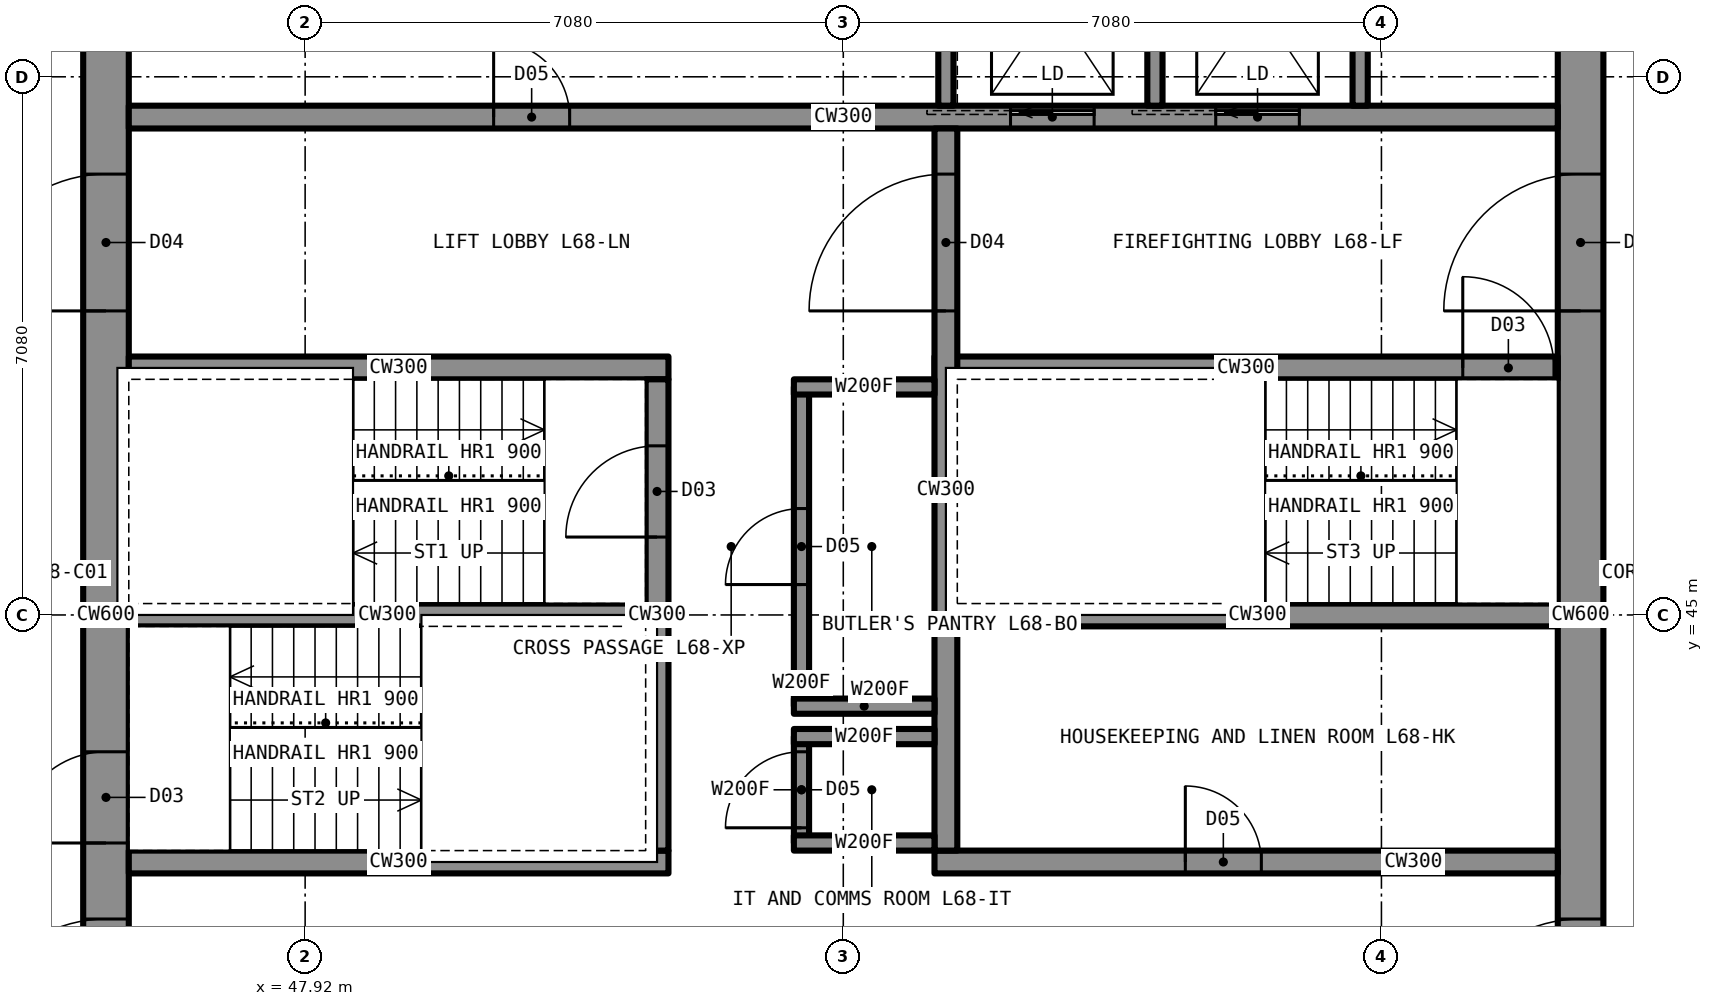
"""IFC4 building model, lengths in metres.
Left out: names, types, materials, properties, quantities, classifications, styles, units other than length and angle.
Written with IfcOpenShell. Run it as: python <this file> out.ifc"""

import sys

from ifc_helpers import new_model, si_unit, direction, frame, frame_2d, origin, place, context, subcontext, project, spatial, rectangle, extrude, element, fill, save


model = new_model("IFC4")
c1 = context("Model", 3, precision=1e-05, world=origin(), true_north=direction((0.0, 1.0)))
c2 = subcontext(c1, "Body", "Model", "MODEL_VIEW")
j1 = project(units=[si_unit("LENGTHUNIT", "METRE"), si_unit("PLANEANGLEUNIT", "RADIAN")], contexts=[c1])
p1 = place(None, origin())
s1 = spatial("IfcSite", under=j1, at=p1, CompositionType="ELEMENT")
p2 = place(p1, origin())
s2 = spatial("IfcBuilding", under=s1, at=p2, CompositionType="ELEMENT")
p3 = place(p2, frame((0.0, 0.0, 247.7)))
s3 = spatial("IfcBuildingStorey", under=s2, at=p3, CompositionType="ELEMENT", Elevation=247.7)
p4 = place(p3, frame((64.7, 35.6, 0.0), z_axis=(0.0, 0.0, 1.0), x_axis=(0.0, 1.0, 0.0)))
e1 = element("IfcWall", 1, at=p4, inside=s3, PredefinedType="SHEAR", context=c2, shape_type="SweptSolid", body=[
    extrude(rectangle(XDim=18.8, YDim=0.6, at=frame_2d((9.4, 0.0))), origin(), (0.0, 0.0, 1.0), 3.5),
])
p5 = place(p4, frame((13.4, 0.0, 0.0)))
e2 = element("IfcOpeningElement", 2, at=p5, cuts=e1, PredefinedType="OPENING", context=c2, shape_type="SweptSolid", body=[
    extrude(rectangle(XDim=1.8, YDim=2.2, at=frame_2d((0.9, 1.1))), frame((0.0, 0.31, 0.0), z_axis=(0.0, -1.0, 0.0), x_axis=(1.0, 0.0, 0.0)), (0.0, 0.0, 1.0), 0.62),
])
p6 = place(p4, frame((3.6, 0.0, 0.0)))
e3 = element("IfcOpeningElement", 3, at=p6, cuts=e1, PredefinedType="OPENING", context=c2, shape_type="SweptSolid", body=[
    extrude(rectangle(XDim=1.8, YDim=2.2, at=frame_2d((0.9, 1.1))), frame((0.0, 0.31, 0.0), z_axis=(0.0, -1.0, 0.0), x_axis=(1.0, 0.0, 0.0)), (0.0, 0.0, 1.0), 0.62),
])
p7 = place(p3, frame((45.3, 35.6, 0.0), z_axis=(0.0, 0.0, 1.0), x_axis=(0.0, 1.0, 0.0)))
e4 = element("IfcWall", 4, at=p7, inside=s3, PredefinedType="SHEAR", context=c2, shape_type="SweptSolid", body=[
    extrude(rectangle(XDim=18.8, YDim=0.6, at=frame_2d((9.4, 0.0))), origin(), (0.0, 0.0, 1.0), 3.5),
])
p8 = place(p7, frame((13.4, 0.0, 0.0)))
e5 = element("IfcOpeningElement", 5, at=p8, cuts=e4, PredefinedType="OPENING", context=c2, shape_type="SweptSolid", body=[
    extrude(rectangle(XDim=1.8, YDim=2.2, at=frame_2d((0.9, 1.1))), frame((0.0, 0.31, 0.0), z_axis=(0.0, -1.0, 0.0), x_axis=(1.0, 0.0, 0.0)), (0.0, 0.0, 1.0), 0.62),
])
p9 = place(p7, frame((3.6, 0.0, 0.0)))
e6 = element("IfcOpeningElement", 6, at=p9, cuts=e4, PredefinedType="OPENING", context=c2, shape_type="SweptSolid", body=[
    extrude(rectangle(XDim=1.8, YDim=2.2, at=frame_2d((0.9, 1.1))), frame((0.0, 0.31, 0.0), z_axis=(0.0, -1.0, 0.0), x_axis=(1.0, 0.0, 0.0)), (0.0, 0.0, 1.0), 0.62),
])
p10 = place(p7, frame((6.4, 0.0, 0.0)))
e7 = element("IfcOpeningElement", 7, at=p10, cuts=e4, PredefinedType="OPENING", context=c2, shape_type="SweptSolid", body=[
    extrude(rectangle(XDim=1.2, YDim=2.2, at=frame_2d((0.6, 1.1))), frame((0.0, 0.31, 0.0), z_axis=(0.0, -1.0, 0.0), x_axis=(1.0, 0.0, 0.0)), (0.0, 0.0, 1.0), 0.62),
])
p11 = place(p3, frame((45.6, 51.55, 0.0), z_axis=(0.0, 0.0, 1.0), x_axis=(1.0, 0.0, 0.0)))
e8 = element("IfcWall", 8, at=p11, inside=s3, PredefinedType="SHEAR", context=c2, shape_type="SweptSolid", body=[
    extrude(rectangle(XDim=18.8, YDim=0.3, at=frame_2d((9.4, 0.0))), origin(), (0.0, 0.0, 1.0), 3.5),
])
p12 = place(p11, frame((4.8, 0.0, 0.0)))
e9 = element("IfcOpeningElement", 9, at=p12, cuts=e8, PredefinedType="OPENING", context=c2, shape_type="SweptSolid", body=[
    extrude(rectangle(XDim=1.0, YDim=2.1, at=frame_2d((0.5, 1.05))), frame((0.0, 0.16, 0.0), z_axis=(0.0, -1.0, 0.0), x_axis=(1.0, 0.0, 0.0)), (0.0, 0.0, 1.0), 0.32),
])
p13 = place(p11, frame((11.6, 0.0, 0.0)))
e10 = element("IfcOpeningElement", 10, at=p13, cuts=e8, PredefinedType="OPENING", context=c2, shape_type="SweptSolid", body=[
    extrude(rectangle(XDim=1.1, YDim=2.2, at=frame_2d((0.55, 1.1))), frame((0.0, 0.16, 0.0), z_axis=(0.0, -1.0, 0.0), x_axis=(1.0, 0.0, 0.0)), (0.0, 0.0, 1.0), 0.32),
])
p14 = place(p11, frame((14.3, 0.0, 0.0)))
e11 = element("IfcOpeningElement", 11, at=p14, cuts=e8, PredefinedType="OPENING", context=c2, shape_type="SweptSolid", body=[
    extrude(rectangle(XDim=1.1, YDim=2.2, at=frame_2d((0.55, 1.1))), frame((0.0, 0.16, 0.0), z_axis=(0.0, -1.0, 0.0), x_axis=(1.0, 0.0, 0.0)), (0.0, 0.0, 1.0), 0.32),
])
p15 = place(p3, frame((45.6, 48.25, 0.0), z_axis=(0.0, 0.0, 1.0), x_axis=(1.0, 0.0, 0.0)))
e12 = element("IfcWall", 12, at=p15, inside=s3, PredefinedType="SHEAR", context=c2, shape_type="SweptSolid", body=[
    extrude(rectangle(XDim=7.1, YDim=0.3, at=frame_2d((3.55, 0.0))), origin(), (0.0, 0.0, 1.0), 3.5),
])
p16 = place(p3, frame((56.2, 48.25, 0.0), z_axis=(0.0, 0.0, 1.0), x_axis=(1.0, 0.0, 0.0)))
e13 = element("IfcWall", 13, at=p16, inside=s3, PredefinedType="SHEAR", context=c2, shape_type="SweptSolid", body=[
    extrude(rectangle(XDim=8.2, YDim=0.3, at=frame_2d((4.1, 0.0))), origin(), (0.0, 0.0, 1.0), 3.5),
])
p17 = place(p16, frame((6.95, 0.0, 0.0)))
e14 = element("IfcOpeningElement", 14, at=p17, cuts=e13, PredefinedType="OPENING", context=c2, shape_type="SweptSolid", body=[
    extrude(rectangle(XDim=1.2, YDim=2.2, at=frame_2d((0.6, 1.1))), frame((0.0, 0.16, 0.0), z_axis=(0.0, -1.0, 0.0), x_axis=(1.0, 0.0, 0.0)), (0.0, 0.0, 1.0), 0.32),
])
p18 = place(p3, frame((45.6, 41.75, 0.0), z_axis=(0.0, 0.0, 1.0), x_axis=(1.0, 0.0, 0.0)))
e15 = element("IfcWall", 15, at=p18, inside=s3, PredefinedType="SHEAR", context=c2, shape_type="SweptSolid", body=[
    extrude(rectangle(XDim=7.1, YDim=0.3, at=frame_2d((3.55, 0.0))), origin(), (0.0, 0.0, 1.0), 3.5),
])
p19 = place(p3, frame((56.2, 41.75, 0.0), z_axis=(0.0, 0.0, 1.0), x_axis=(1.0, 0.0, 0.0)))
e16 = element("IfcWall", 16, at=p19, inside=s3, PredefinedType="SHEAR", context=c2, shape_type="SweptSolid", body=[
    extrude(rectangle(XDim=8.2, YDim=0.3, at=frame_2d((4.1, 0.0))), origin(), (0.0, 0.0, 1.0), 3.5),
])
p20 = place(p19, frame((3.3, 0.0, 0.0)))
e17 = element("IfcOpeningElement", 17, at=p20, cuts=e16, PredefinedType="OPENING", context=c2, shape_type="SweptSolid", body=[
    extrude(rectangle(XDim=1.0, YDim=2.1, at=frame_2d((0.5, 1.05))), frame((0.0, 0.16, 0.0), z_axis=(0.0, -1.0, 0.0), x_axis=(1.0, 0.0, 0.0)), (0.0, 0.0, 1.0), 0.32),
])
p21 = place(p3, frame((52.55, 41.9, 0.0), z_axis=(0.0, 0.0, 1.0), x_axis=(0.0, 1.0, 0.0)))
e18 = element("IfcWall", 18, at=p21, inside=s3, PredefinedType="SHEAR", context=c2, shape_type="SweptSolid", body=[
    extrude(rectangle(XDim=6.2, YDim=0.3, at=frame_2d((3.1, 0.0))), origin(), (0.0, 0.0, 1.0), 3.5),
])
p22 = place(p21, frame((4.125, 0.0, 0.0)))
e19 = element("IfcOpeningElement", 19, at=p22, cuts=e18, PredefinedType="OPENING", context=c2, shape_type="SweptSolid", body=[
    extrude(rectangle(XDim=1.2, YDim=2.2, at=frame_2d((0.6, 1.1))), frame((0.0, 0.16, 0.0), z_axis=(0.0, -1.0, 0.0), x_axis=(1.0, 0.0, 0.0)), (0.0, 0.0, 1.0), 0.32),
])
p23 = place(p3, frame((56.35, 41.9, 0.0), z_axis=(0.0, 0.0, 1.0), x_axis=(0.0, 1.0, 0.0)))
e20 = element("IfcWall", 20, at=p23, inside=s3, PredefinedType="SHEAR", context=c2, shape_type="SweptSolid", body=[
    extrude(rectangle(XDim=9.5, YDim=0.3, at=frame_2d((4.75, 0.0))), origin(), (0.0, 0.0, 1.0), 3.5),
])
p24 = place(p23, frame((7.1, 0.0, 0.0)))
e21 = element("IfcOpeningElement", 21, at=p24, cuts=e20, PredefinedType="OPENING", context=c2, shape_type="SweptSolid", body=[
    extrude(rectangle(XDim=1.8, YDim=2.2, at=frame_2d((0.9, 1.1))), frame((0.0, 0.16, 0.0), z_axis=(0.0, -1.0, 0.0), x_axis=(1.0, 0.0, 0.0)), (0.0, 0.0, 1.0), 0.32),
])
p25 = place(p3, frame((45.6, 45.0, 0.0), z_axis=(0.0, 0.0, 1.0), x_axis=(1.0, 0.0, 0.0)))
e22 = element("IfcWall", 22, at=p25, inside=s3, PredefinedType="SHEAR", context=c2, shape_type="SweptSolid", body=[
    extrude(rectangle(XDim=6.8, YDim=0.3, at=frame_2d((3.4, 0.0))), origin(), (0.0, 0.0, 1.0), 3.5),
])
p26 = place(p3, frame((56.5, 45.0, 0.0), z_axis=(0.0, 0.0, 1.0), x_axis=(1.0, 0.0, 0.0)))
e23 = element("IfcWall", 23, at=p26, inside=s3, PredefinedType="SHEAR", context=c2, shape_type="SweptSolid", body=[
    extrude(rectangle(XDim=7.9, YDim=0.3, at=frame_2d((3.95, 0.0))), origin(), (0.0, 0.0, 1.0), 3.5),
])
p27 = place(p3, frame((54.45, 42.0, 0.0), z_axis=(0.0, 0.0, 1.0), x_axis=(0.0, 1.0, 0.0)))
e24 = element("IfcWall", 24, at=p27, inside=s3, PredefinedType="PARTITIONING", context=c2, shape_type="SweptSolid", body=[
    extrude(rectangle(XDim=1.3, YDim=0.2, at=frame_2d((0.65, 0.0))), origin(), (0.0, 0.0, 1.0), 3.33),
])
p28 = place(p27, frame((0.15, 0.0, 0.0)))
e25 = element("IfcOpeningElement", 25, at=p28, cuts=e24, PredefinedType="OPENING", context=c2, shape_type="SweptSolid", body=[
    extrude(rectangle(XDim=1.0, YDim=2.1, at=frame_2d((0.5, 1.05))), frame((0.0, 0.11, 0.0), z_axis=(0.0, -1.0, 0.0), x_axis=(1.0, 0.0, 0.0)), (0.0, 0.0, 1.0), 0.22),
])
for number, where, z_axis, x_axis in (
    (26, (54.35, 42.0, 0.0), (0.0, 0.0, 1.0), (1.0, 0.0, 0.0)),
    (27, (54.35, 43.3, 0.0), (0.0, 0.0, 1.0), (1.0, 0.0, 0.0)),
):
    element("IfcWall", number, at=place(p3, frame(where, z_axis=z_axis, x_axis=x_axis)), inside=s3, PredefinedType="PARTITIONING", context=c2, shape_type="SweptSolid", body=[
        extrude(rectangle(XDim=1.85, YDim=0.2, at=frame_2d((0.925, 0.0))), origin(), (0.0, 0.0, 1.0), 3.33),
    ])
p29 = place(p3, frame((54.45, 43.7, 0.0), z_axis=(0.0, 0.0, 1.0), x_axis=(0.0, 1.0, 0.0)))
e28 = element("IfcWall", 28, at=p29, inside=s3, PredefinedType="PARTITIONING", context=c2, shape_type="SweptSolid", body=[
    extrude(rectangle(XDim=2.6, YDim=0.2, at=frame_2d((1.3, 0.0))), origin(), (0.0, 0.0, 1.0), 3.33),
])
p30 = place(p29, frame((0.8, 0.0, 0.0)))
e29 = element("IfcOpeningElement", 29, at=p30, cuts=e28, PredefinedType="OPENING", context=c2, shape_type="SweptSolid", body=[
    extrude(rectangle(XDim=1.0, YDim=2.1, at=frame_2d((0.5, 1.05))), frame((0.0, 0.11, 0.0), z_axis=(0.0, -1.0, 0.0), x_axis=(1.0, 0.0, 0.0)), (0.0, 0.0, 1.0), 0.22),
])
for number, where, z_axis, x_axis in (
    (30, (54.35, 43.7, 0.0), (0.0, 0.0, 1.0), (1.0, 0.0, 0.0)),
    (31, (54.35, 46.3, 0.0), (0.0, 0.0, 1.0), (1.0, 0.0, 0.0)),
):
    element("IfcWall", number, at=place(p3, frame(where, z_axis=z_axis, x_axis=x_axis)), inside=s3, PredefinedType="PARTITIONING", context=c2, shape_type="SweptSolid", body=[
        extrude(rectangle(XDim=1.85, YDim=0.2, at=frame_2d((0.925, 0.0))), origin(), (0.0, 0.0, 1.0), 3.33),
    ])
p31 = place(p3, frame((54.45, 46.7, 0.0), z_axis=(0.0, 0.0, 1.0), x_axis=(0.0, 1.0, 0.0)))
e32 = element("IfcWall", 32, at=p31, inside=s3, PredefinedType="PARTITIONING", context=c2, shape_type="SweptSolid", body=[
    extrude(rectangle(XDim=1.3, YDim=0.2, at=frame_2d((0.65, 0.0))), origin(), (0.0, 0.0, 1.0), 3.33),
])
p32 = place(p31, frame((0.15, 0.0, 0.0)))
e33 = element("IfcOpeningElement", 33, at=p32, cuts=e32, PredefinedType="OPENING", context=c2, shape_type="SweptSolid", body=[
    extrude(rectangle(XDim=1.0, YDim=2.1, at=frame_2d((0.5, 1.05))), frame((0.0, 0.11, 0.0), z_axis=(0.0, -1.0, 0.0), x_axis=(1.0, 0.0, 0.0)), (0.0, 0.0, 1.0), 0.22),
])
for number, where, z_axis, x_axis in (
    (34, (54.35, 46.7, 0.0), (0.0, 0.0, 1.0), (1.0, 0.0, 0.0)),
    (35, (54.35, 48.0, 0.0), (0.0, 0.0, 1.0), (1.0, 0.0, 0.0)),
):
    element("IfcWall", number, at=place(p3, frame(where, z_axis=z_axis, x_axis=x_axis)), inside=s3, PredefinedType="PARTITIONING", context=c2, shape_type="SweptSolid", body=[
        extrude(rectangle(XDim=1.85, YDim=0.2, at=frame_2d((0.925, 0.0))), origin(), (0.0, 0.0, 1.0), 3.33),
    ])
for number, where, z_axis, x_axis in (
    (36, (59.1, 51.7, 0.0), (0.0, 0.0, 1.0), (0.0, 1.0, 0.0)),
    (37, (61.8, 51.7, 0.0), (0.0, 0.0, 1.0), (0.0, 1.0, 0.0)),
    (38, (56.35, 51.7, 0.0), (0.0, 0.0, 1.0), (0.0, 1.0, 0.0)),
):
    element("IfcWall", number, at=place(p3, frame(where, z_axis=z_axis, x_axis=x_axis)), inside=s3, PredefinedType="PARTITIONING", context=c2, shape_type="SweptSolid", body=[
        extrude(rectangle(XDim=2.7, YDim=0.2, at=frame_2d((1.35, 0.0))), origin(), (0.0, 0.0, 1.0), 3.33),
    ])
p33 = place(p28, origin())
e39 = element("IfcDoor", 39, at=p33, inside=s3, OperationType="SINGLE_SWING_LEFT", PredefinedType="DOOR", context=c2, shape_type="SweptSolid", body=[
    extrude(rectangle(XDim=1.0, YDim=2.1, at=frame_2d((0.5, 1.05))), frame((0.0, 0.025, 0.0), z_axis=(0.0, -1.0, 0.0), x_axis=(1.0, 0.0, 0.0)), (0.0, 0.0, 1.0), 0.05),
])
fill(e25, e39)
p34 = place(p30, origin())
e40 = element("IfcDoor", 40, at=p34, inside=s3, OperationType="SINGLE_SWING_LEFT", PredefinedType="DOOR", context=c2, shape_type="SweptSolid", body=[
    extrude(rectangle(XDim=1.0, YDim=2.1, at=frame_2d((0.5, 1.05))), frame((0.0, 0.025, 0.0), z_axis=(0.0, -1.0, 0.0), x_axis=(1.0, 0.0, 0.0)), (0.0, 0.0, 1.0), 0.05),
])
fill(e29, e40)
p35 = place(p32, origin())
e41 = element("IfcDoor", 41, at=p35, inside=s3, OperationType="SINGLE_SWING_LEFT", PredefinedType="DOOR", context=c2, shape_type="SweptSolid", body=[
    extrude(rectangle(XDim=1.0, YDim=2.1, at=frame_2d((0.5, 1.05))), frame((0.0, 0.025, 0.0), z_axis=(0.0, -1.0, 0.0), x_axis=(1.0, 0.0, 0.0)), (0.0, 0.0, 1.0), 0.05),
])
fill(e33, e41)
p36 = place(p8, origin())
e42 = element("IfcDoor", 42, at=p36, inside=s3, OperationType="DOUBLE_DOOR_SINGLE_SWING", PredefinedType="DOOR", context=c2, shape_type="SweptSolid", body=[
    extrude(rectangle(XDim=1.8, YDim=2.2, at=frame_2d((0.9, 1.1))), frame((0.0, 0.025, 0.0), z_axis=(0.0, -1.0, 0.0), x_axis=(1.0, 0.0, 0.0)), (0.0, 0.0, 1.0), 0.05),
])
fill(e5, e42)
p37 = place(p9, origin())
e43 = element("IfcDoor", 43, at=p37, inside=s3, OperationType="DOUBLE_DOOR_SINGLE_SWING", PredefinedType="DOOR", context=c2, shape_type="SweptSolid", body=[
    extrude(rectangle(XDim=1.8, YDim=2.2, at=frame_2d((0.9, 1.1))), frame((0.0, 0.025, 0.0), z_axis=(0.0, -1.0, 0.0), x_axis=(1.0, 0.0, 0.0)), (0.0, 0.0, 1.0), 0.05),
])
fill(e6, e43)
p38 = place(p5, origin())
e44 = element("IfcDoor", 44, at=p38, inside=s3, OperationType="DOUBLE_DOOR_SINGLE_SWING", PredefinedType="DOOR", context=c2, shape_type="SweptSolid", body=[
    extrude(rectangle(XDim=1.8, YDim=2.2, at=frame_2d((0.9, 1.1))), frame((0.0, 0.025, 0.0), z_axis=(0.0, -1.0, 0.0), x_axis=(1.0, 0.0, 0.0)), (0.0, 0.0, 1.0), 0.05),
])
fill(e2, e44)
p39 = place(p6, origin())
e45 = element("IfcDoor", 45, at=p39, inside=s3, OperationType="DOUBLE_DOOR_SINGLE_SWING", PredefinedType="DOOR", context=c2, shape_type="SweptSolid", body=[
    extrude(rectangle(XDim=1.8, YDim=2.2, at=frame_2d((0.9, 1.1))), frame((0.0, 0.025, 0.0), z_axis=(0.0, -1.0, 0.0), x_axis=(1.0, 0.0, 0.0)), (0.0, 0.0, 1.0), 0.05),
])
fill(e3, e45)
p40 = place(p24, origin())
e46 = element("IfcDoor", 46, at=p40, inside=s3, OperationType="DOUBLE_DOOR_SINGLE_SWING", PredefinedType="DOOR", context=c2, shape_type="SweptSolid", body=[
    extrude(rectangle(XDim=1.8, YDim=2.2, at=frame_2d((0.9, 1.1))), frame((0.0, 0.025, 0.0), z_axis=(0.0, -1.0, 0.0), x_axis=(1.0, 0.0, 0.0)), (0.0, 0.0, 1.0), 0.05),
])
fill(e21, e46)
p41 = place(p22, origin())
e47 = element("IfcDoor", 47, at=p41, inside=s3, OperationType="SINGLE_SWING_LEFT", PredefinedType="DOOR", context=c2, shape_type="SweptSolid", body=[
    extrude(rectangle(XDim=1.2, YDim=2.2, at=frame_2d((0.6, 1.1))), frame((0.0, 0.025, 0.0), z_axis=(0.0, -1.0, 0.0), x_axis=(1.0, 0.0, 0.0)), (0.0, 0.0, 1.0), 0.05),
])
fill(e19, e47)
p42 = place(p10, origin())
e48 = element("IfcDoor", 48, at=p42, inside=s3, OperationType="SINGLE_SWING_LEFT", PredefinedType="DOOR", context=c2, shape_type="SweptSolid", body=[
    extrude(rectangle(XDim=1.2, YDim=2.2, at=frame_2d((0.6, 1.1))), frame((0.0, 0.025, 0.0), z_axis=(0.0, -1.0, 0.0), x_axis=(1.0, 0.0, 0.0)), (0.0, 0.0, 1.0), 0.05),
])
fill(e7, e48)
p43 = place(p17, origin())
e49 = element("IfcDoor", 49, at=p43, inside=s3, OperationType="SINGLE_SWING_LEFT", PredefinedType="DOOR", context=c2, shape_type="SweptSolid", body=[
    extrude(rectangle(XDim=1.2, YDim=2.2, at=frame_2d((0.6, 1.1))), frame((0.0, 0.025, 0.0), z_axis=(0.0, -1.0, 0.0), x_axis=(1.0, 0.0, 0.0)), (0.0, 0.0, 1.0), 0.05),
])
fill(e14, e49)
p44 = place(p20, origin())
e50 = element("IfcDoor", 50, at=p44, inside=s3, OperationType="SINGLE_SWING_LEFT", PredefinedType="DOOR", context=c2, shape_type="SweptSolid", body=[
    extrude(rectangle(XDim=1.0, YDim=2.1, at=frame_2d((0.5, 1.05))), frame((0.0, 0.025, 0.0), z_axis=(0.0, -1.0, 0.0), x_axis=(1.0, 0.0, 0.0)), (0.0, 0.0, 1.0), 0.05),
])
fill(e17, e50)
p45 = place(p12, origin())
e51 = element("IfcDoor", 51, at=p45, inside=s3, OperationType="SINGLE_SWING_LEFT", PredefinedType="DOOR", context=c2, shape_type="SweptSolid", body=[
    extrude(rectangle(XDim=1.0, YDim=2.1, at=frame_2d((0.5, 1.05))), frame((0.0, 0.025, 0.0), z_axis=(0.0, -1.0, 0.0), x_axis=(1.0, 0.0, 0.0)), (0.0, 0.0, 1.0), 0.05),
])
fill(e9, e51)
p46 = place(p13, origin())
e52 = element("IfcDoor", 52, at=p46, inside=s3, OperationType="SLIDING_TO_LEFT", PredefinedType="DOOR", context=c2, shape_type="SweptSolid", body=[
    extrude(rectangle(XDim=1.1, YDim=2.2, at=frame_2d((0.55, 1.1))), frame((0.0, 0.025, 0.0), z_axis=(0.0, -1.0, 0.0), x_axis=(1.0, 0.0, 0.0)), (0.0, 0.0, 1.0), 0.05),
])
fill(e10, e52)
p47 = place(p14, origin())
e53 = element("IfcDoor", 53, at=p47, inside=s3, OperationType="SLIDING_TO_LEFT", PredefinedType="DOOR", context=c2, shape_type="SweptSolid", body=[
    extrude(rectangle(XDim=1.1, YDim=2.2, at=frame_2d((0.55, 1.1))), frame((0.0, 0.025, 0.0), z_axis=(0.0, -1.0, 0.0), x_axis=(1.0, 0.0, 0.0)), (0.0, 0.0, 1.0), 0.05),
])
fill(e11, e53)
save(model, sys.argv[1])
